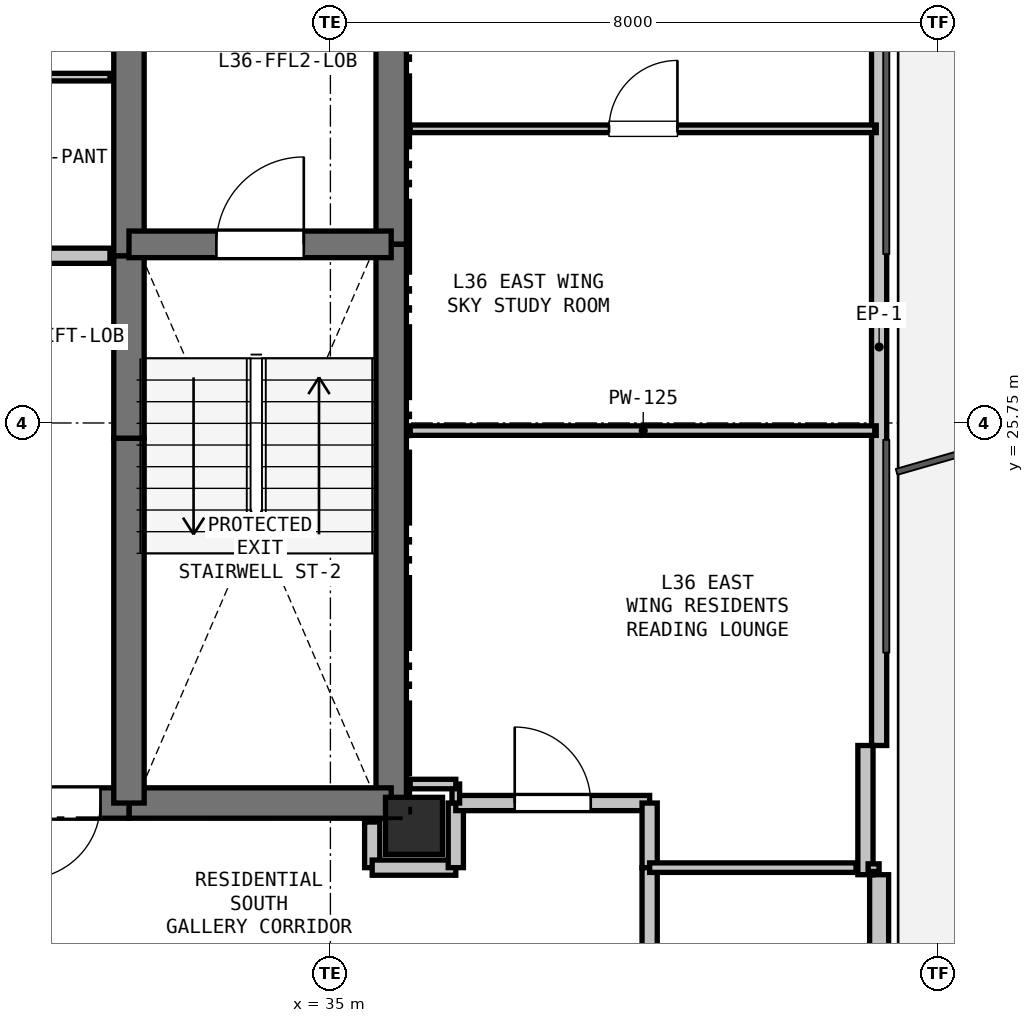
"""IFC4 building model, lengths in metres.
Left out: names, types, materials, properties, quantities, classifications, styles, units other than length and angle.
Written with IfcOpenShell. Run it as: python <this file> out.ifc"""

import sys

from ifc_helpers import new_model, si_unit, direction, frame, frame_2d, origin, origin_2d, place, context, subcontext, project, spatial, rectangle, extrude, element, fill, save


model = new_model("IFC4")
c1 = context("Model", 3, precision=1e-05, world=origin(), true_north=direction((0.0, 1.0)))
c2 = subcontext(c1, "Body", "Model", "MODEL_VIEW")
j1 = project(units=[si_unit("LENGTHUNIT", "METRE"), si_unit("PLANEANGLEUNIT", "RADIAN")], contexts=[c1])
p1 = place(None, origin())
s1 = spatial("IfcSite", under=j1, at=p1, CompositionType="ELEMENT")
p2 = place(p1, origin())
s2 = spatial("IfcBuilding", under=s1, at=p2, CompositionType="ELEMENT")
p3 = place(p2, frame((0.0, 0.0, 131.1)))
s3 = spatial("IfcBuildingStorey", under=s2, at=p3, CompositionType="ELEMENT", Elevation=131.1)
p4 = place(p3, frame((36.1, 20.45, 0.0), z_axis=(0.0, 0.0, 1.0), x_axis=(1.0, 0.0, 0.0)))
e1 = element("IfcColumn", 1, at=p4, inside=s3, PredefinedType="COLUMN", context=c2, shape_type="SweptSolid", body=[
    extrude(rectangle(XDim=0.75, YDim=0.75, at=origin_2d()), origin(), (0.0, 0.0, 1.0), 3.3),
])
p5 = place(p3, frame((42.219, 31.993, 0.0), z_axis=(0.0, 0.0, 1.0), x_axis=(0.0, -1.0, 0.0)))
e2 = element("IfcWall", 2, at=p5, inside=s3, PredefinedType="PARAPET", context=c2, shape_type="SweptSolid", body=[
    extrude(rectangle(XDim=10.486, YDim=0.2, at=frame_2d((5.243, 0.0))), origin(), (0.0, 0.0, 1.0), 0.2),
])
p6 = place(p3, frame((42.219, 19.807, 0.0), z_axis=(0.0, 0.0, 1.0), x_axis=(0.0, -1.0, 0.0)))
e3 = element("IfcWall", 3, at=p6, inside=s3, PredefinedType="SOLIDWALL", context=c2, shape_type="SweptSolid", body=[
    extrude(rectangle(XDim=11.186, YDim=0.25, at=frame_2d((5.593, 0.0))), origin(), (0.0, 0.0, 1.0), 2.68),
])
p7 = place(p6, frame((9.327, 0.0, 0.9)))
e4 = element("IfcOpeningElement", 4, at=p7, cuts=e3, PredefinedType="OPENING", context=c2, shape_type="SweptSolid", body=[
    extrude(rectangle(XDim=1.2, YDim=1.4, at=frame_2d((0.6, 0.7))), frame((0.0, 0.135, 0.0), z_axis=(0.0, -1.0, 0.0), x_axis=(1.0, 0.0, 0.0)), (0.0, 0.0, 1.0), 0.27),
])
p8 = place(p3, frame((42.039, 21.507, 0.0), z_axis=(0.0, 0.0, 1.0), x_axis=(0.0, -1.0, 0.0)))
e5 = element("IfcWall", 5, at=p8, inside=s3, PredefinedType="PARAPET", context=c2, shape_type="SweptSolid", body=[
    extrude(rectangle(XDim=1.7, YDim=0.2, at=frame_2d((0.85, 0.0))), origin(), (0.0, 0.0, 1.0), 2.68),
])
p9 = place(p3, frame((35.8, 32.75, 0.0), z_axis=(0.0, 0.0, 1.0), x_axis=(0.0, -1.0, 0.0)))
e6 = element("IfcWall", 6, at=p9, inside=s3, PredefinedType="SHEAR", context=c2, shape_type="SweptSolid", body=[
    extrude(rectangle(XDim=4.65, YDim=0.4, at=frame_2d((2.325, 0.0))), origin(), (0.0, 0.0, 1.0), 3.06),
])
p10 = place(p3, frame((35.8, 28.1, 0.0), z_axis=(0.0, 0.0, 1.0), x_axis=(0.0, -1.0, 0.0)))
e7 = element("IfcWall", 7, at=p10, inside=s3, PredefinedType="SHEAR", context=c2, shape_type="SweptSolid", body=[
    extrude(rectangle(XDim=7.35, YDim=0.4, at=frame_2d((3.675, 0.0))), origin(), (0.0, 0.0, 1.0), 3.06),
])
p11 = place(p3, frame((35.8, 20.75, 0.0), z_axis=(0.0, 0.0, 1.0), x_axis=(-1.0, 0.0, 0.0)))
e8 = element("IfcWall", 8, at=p11, inside=s3, PredefinedType="SHEAR", context=c2, shape_type="SweptSolid", body=[
    extrude(rectangle(XDim=3.45, YDim=0.4, at=frame_2d((1.725, 0.0))), origin(), (0.0, 0.0, 1.0), 3.06),
])
p12 = place(p3, frame((32.35, 20.75, 0.0), z_axis=(0.0, 0.0, 1.0), x_axis=(-1.0, 0.0, 0.0)))
e9 = element("IfcWall", 9, at=p12, inside=s3, PredefinedType="SHEAR", context=c2, shape_type="SweptSolid", body=[
    extrude(rectangle(XDim=1.75, YDim=0.4, at=frame_2d((0.875, 0.0))), origin(), (0.0, 0.0, 1.0), 3.06),
])
p13 = place(p12, frame((0.375, 0.0, 0.0)))
e10 = element("IfcOpeningElement", 10, at=p13, cuts=e9, PredefinedType="OPENING", context=c2, shape_type="SweptSolid", body=[
    extrude(rectangle(XDim=1.0, YDim=2.15, at=frame_2d((0.5, 1.075))), frame((0.0, 0.21, 0.0), z_axis=(0.0, -1.0, 0.0), x_axis=(1.0, 0.0, 0.0)), (0.0, 0.0, 1.0), 0.42),
])
p14 = place(p3, frame((32.35, 20.75, 0.0), z_axis=(0.0, 0.0, 1.0), x_axis=(0.0, 1.0, 0.0)))
e11 = element("IfcWall", 11, at=p14, inside=s3, PredefinedType="SHEAR", context=c2, shape_type="SweptSolid", body=[
    extrude(rectangle(XDim=4.8, YDim=0.4, at=frame_2d((2.4, 0.0))), origin(), (0.0, 0.0, 1.0), 3.06),
])
p15 = place(p3, frame((32.35, 25.55, 0.0), z_axis=(0.0, 0.0, 1.0), x_axis=(0.0, 1.0, 0.0)))
e12 = element("IfcWall", 12, at=p15, inside=s3, PredefinedType="SHEAR", context=c2, shape_type="SweptSolid", body=[
    extrude(rectangle(XDim=2.4, YDim=0.4, at=frame_2d((1.2, 0.0))), origin(), (0.0, 0.0, 1.0), 3.06),
])
p16 = place(p3, frame((32.35, 27.95, 0.0), z_axis=(0.0, 0.0, 1.0), x_axis=(0.0, 1.0, 0.0)))
e13 = element("IfcWall", 13, at=p16, inside=s3, PredefinedType="SHEAR", context=c2, shape_type="SweptSolid", body=[
    extrude(rectangle(XDim=2.8, YDim=0.4, at=frame_2d((1.4, 0.0))), origin(), (0.0, 0.0, 1.0), 3.06),
])
p17 = place(p3, frame((32.35, 28.1, 0.0), z_axis=(0.0, 0.0, 1.0), x_axis=(1.0, 0.0, 0.0)))
e14 = element("IfcWall", 14, at=p17, inside=s3, PredefinedType="SHEAR", context=c2, shape_type="SweptSolid", body=[
    extrude(rectangle(XDim=3.45, YDim=0.35, at=frame_2d((1.725, 0.0))), origin(), (0.0, 0.0, 1.0), 3.06),
])
p18 = place(p17, frame((1.15, 0.0, 0.0)))
e15 = element("IfcOpeningElement", 15, at=p18, cuts=e14, PredefinedType="OPENING", context=c2, shape_type="SweptSolid", body=[
    extrude(rectangle(XDim=1.15, YDim=2.15, at=frame_2d((0.575, 1.075))), frame((0.0, 0.185, 0.0), z_axis=(0.0, -1.0, 0.0), x_axis=(1.0, 0.0, 0.0)), (0.0, 0.0, 1.0), 0.37),
])
p19 = place(p3, frame((32.1, 30.3, 0.0), z_axis=(0.0, 0.0, 1.0), x_axis=(-1.0, 0.0, 0.0)))
e16 = element("IfcWall", 16, at=p19, inside=s3, PredefinedType="PARTITIONING", context=c2, shape_type="SweptSolid", body=[
    extrude(rectangle(XDim=2.45, YDim=0.1, at=frame_2d((1.225, 0.0))), origin(), (0.0, 0.0, 1.0), 3.06),
])
p20 = place(p3, frame((27.4, 27.95, 0.0), z_axis=(0.0, 0.0, 1.0), x_axis=(1.0, 0.0, 0.0)))
e17 = element("IfcWall", 17, at=p20, inside=s3, PredefinedType="PARTITIONING", context=c2, shape_type="SweptSolid", body=[
    extrude(rectangle(XDim=4.7, YDim=0.2, at=frame_2d((2.35, 0.0))), origin(), (0.0, 0.0, 1.0), 3.06),
])
p21 = place(p20, frame((1.85, 0.0, 0.0)))
e18 = element("IfcOpeningElement", 18, at=p21, cuts=e17, PredefinedType="OPENING", context=c2, shape_type="SweptSolid", body=[
    extrude(rectangle(XDim=1.0, YDim=2.15, at=frame_2d((0.5, 1.075))), frame((0.0, 0.11, 0.0), z_axis=(0.0, -1.0, 0.0), x_axis=(1.0, 0.0, 0.0)), (0.0, 0.0, 1.0), 0.22),
])
p22 = place(p3, frame((35.55, 20.5, 0.0), z_axis=(0.0, 0.0, 1.0), x_axis=(0.0, -1.0, 0.0)))
e19 = element("IfcWall", 19, at=p22, inside=s3, PredefinedType="PARTITIONING", context=c2, shape_type="SweptSolid", body=[
    extrude(rectangle(XDim=0.6, YDim=0.2, at=frame_2d((0.3, 0.0))), origin(), (0.0, 0.0, 1.0), 2.508),
])
p23 = place(p3, frame((35.55, 19.9, 0.0), z_axis=(0.0, 0.0, 1.0), x_axis=(1.0, 0.0, 0.0)))
e20 = element("IfcWall", 20, at=p23, inside=s3, PredefinedType="PARTITIONING", context=c2, shape_type="SweptSolid", body=[
    extrude(rectangle(XDim=1.1, YDim=0.2, at=frame_2d((0.55, 0.0))), origin(), (0.0, 0.0, 1.0), 2.433),
])
p24 = place(p3, frame((36.65, 19.9, 0.0), z_axis=(0.0, 0.0, 1.0), x_axis=(0.0, 1.0, 0.0)))
e21 = element("IfcWall", 21, at=p24, inside=s3, PredefinedType="PARTITIONING", context=c2, shape_type="SweptSolid", body=[
    extrude(rectangle(XDim=0.85, YDim=0.2, at=frame_2d((0.425, 0.0))), origin(), (0.0, 0.0, 1.0), 3.06),
])
p25 = place(p3, frame((36.65, 20.75, 0.0), z_axis=(0.0, 0.0, 1.0), x_axis=(1.0, 0.0, 0.0)))
e22 = element("IfcWall", 22, at=p25, inside=s3, PredefinedType="PARTITIONING", context=c2, shape_type="SweptSolid", body=[
    extrude(rectangle(XDim=2.55, YDim=0.2, at=frame_2d((1.275, 0.0))), origin(), (0.0, 0.0, 1.0), 3.06),
])
p26 = place(p25, frame((0.775, 0.0, 0.0)))
e23 = element("IfcOpeningElement", 23, at=p26, cuts=e22, PredefinedType="OPENING", context=c2, shape_type="SweptSolid", body=[
    extrude(rectangle(XDim=1.0, YDim=2.15, at=frame_2d((0.5, 1.075))), frame((0.0, 0.11, 0.0), z_axis=(0.0, -1.0, 0.0), x_axis=(1.0, 0.0, 0.0)), (0.0, 0.0, 1.0), 0.22),
])
p27 = place(p3, frame((39.2, 20.75, 0.0), z_axis=(0.0, 0.0, 1.0), x_axis=(0.0, -1.0, 0.0)))
e24 = element("IfcWall", 24, at=p27, inside=s3, PredefinedType="PARTITIONING", context=c2, shape_type="SweptSolid", body=[
    extrude(rectangle(XDim=0.85, YDim=0.2, at=frame_2d((0.425, 0.0))), origin(), (0.0, 0.0, 1.0), 3.06),
])
p28 = place(p3, frame((39.2, 19.9, 0.0), z_axis=(0.0, 0.0, 1.0), x_axis=(0.0, -1.0, 0.0)))
e25 = element("IfcWall", 25, at=p28, inside=s3, PredefinedType="PARTITIONING", context=c2, shape_type="SweptSolid", body=[
    extrude(rectangle(XDim=1.75, YDim=0.2, at=frame_2d((0.875, 0.0))), origin(), (0.0, 0.0, 1.0), 3.06),
])
p29 = place(p3, frame((36.05, 29.62, 0.0), z_axis=(0.0, 0.0, 1.0), x_axis=(1.0, 0.0, 0.0)))
e26 = element("IfcWall", 26, at=p29, inside=s3, PredefinedType="PARTITIONING", context=c2, shape_type="SweptSolid", body=[
    extrude(rectangle(XDim=6.131, YDim=0.1, at=frame_2d((3.065, 0.0))), origin(), (0.0, 0.0, 1.0), 2.365),
])
p30 = place(p29, frame((2.615, 0.0, 0.0)))
e27 = element("IfcOpeningElement", 27, at=p30, cuts=e26, PredefinedType="OPENING", context=c2, shape_type="SweptSolid", body=[
    extrude(rectangle(XDim=0.9, YDim=2.1, at=frame_2d((0.45, 1.05))), frame((0.0, 0.06, 0.0), z_axis=(0.0, -1.0, 0.0), x_axis=(1.0, 0.0, 0.0)), (0.0, 0.0, 1.0), 0.12),
])
p31 = place(p3, frame((42.181, 25.65, 0.0), z_axis=(0.0, 0.0, 1.0), x_axis=(-1.0, 0.0, 0.0)))
e28 = element("IfcWall", 28, at=p31, inside=s3, PredefinedType="PARTITIONING", context=c2, shape_type="SweptSolid", body=[
    extrude(rectangle(XDim=6.131, YDim=0.125, at=frame_2d((3.065, 0.0))), origin(), (0.0, 0.0, 1.0), 2.365),
])
p32 = place(p3, frame((36.65, 20.75, 0.0), z_axis=(0.0, 0.0, 1.0), x_axis=(0.0, 1.0, 0.0)))
e29 = element("IfcWall", 29, at=p32, inside=s3, PredefinedType="PARTITIONING", context=c2, shape_type="SweptSolid", body=[
    extrude(rectangle(XDim=0.25, YDim=0.1, at=frame_2d((0.125, 0.0))), origin(), (0.0, 0.0, 1.0), 3.06),
])
p33 = place(p3, frame((36.65, 21.0, 0.0), z_axis=(0.0, 0.0, 1.0), x_axis=(-1.0, 0.0, 0.0)))
e30 = element("IfcWall", 30, at=p33, inside=s3, PredefinedType="PARTITIONING", context=c2, shape_type="SweptSolid", body=[
    extrude(rectangle(XDim=0.6, YDim=0.125, at=frame_2d((0.3, 0.0))), origin(), (0.0, 0.0, 1.0), 2.508),
])
p34 = place(p3, frame((42.219, 19.9, 0.0), z_axis=(0.0, 0.0, 1.0), x_axis=(-1.0, 0.0, 0.0)))
e31 = element("IfcWall", 31, at=p34, inside=s3, PredefinedType="PARTITIONING", context=c2, shape_type="SweptSolid", body=[
    extrude(rectangle(XDim=0.145, YDim=0.1, at=frame_2d((0.072, 0.0))), origin(), (0.0, 0.0, 1.0), 3.06),
])
p35 = place(p3, frame((41.915, 19.9, 0.0), z_axis=(0.0, 0.0, 1.0), x_axis=(-1.0, 0.0, 0.0)))
e32 = element("IfcWall", 32, at=p35, inside=s3, PredefinedType="PARTITIONING", context=c2, shape_type="SweptSolid", body=[
    extrude(rectangle(XDim=2.715, YDim=0.125, at=frame_2d((1.358, 0.0))), origin(), (0.0, 0.0, 1.0), 2.365),
])
p36 = place(p13, origin())
e33 = element("IfcDoor", 33, at=p36, inside=s3, OperationType="SINGLE_SWING_RIGHT", PredefinedType="DOOR", context=c2, shape_type="SweptSolid", body=[
    extrude(rectangle(XDim=1.0, YDim=2.15, at=frame_2d((0.5, 1.075))), frame((0.0, 0.025, 0.0), z_axis=(0.0, -1.0, 0.0), x_axis=(1.0, 0.0, 0.0)), (0.0, 0.0, 1.0), 0.05),
])
fill(e10, e33)
p37 = place(p18, origin())
e34 = element("IfcDoor", 34, at=p37, inside=s3, OperationType="SINGLE_SWING_RIGHT", PredefinedType="DOOR", context=c2, shape_type="SweptSolid", body=[
    extrude(rectangle(XDim=1.15, YDim=2.15, at=frame_2d((0.575, 1.075))), frame((0.0, 0.025, 0.0), z_axis=(0.0, -1.0, 0.0), x_axis=(1.0, 0.0, 0.0)), (0.0, 0.0, 1.0), 0.05),
])
fill(e15, e34)
p38 = place(p26, origin())
e35 = element("IfcDoor", 35, at=p38, inside=s3, OperationType="SINGLE_SWING_LEFT", PredefinedType="DOOR", context=c2, shape_type="SweptSolid", body=[
    extrude(rectangle(XDim=1.0, YDim=2.15, at=frame_2d((0.5, 1.075))), frame((0.0, 0.025, 0.0), z_axis=(0.0, -1.0, 0.0), x_axis=(1.0, 0.0, 0.0)), (0.0, 0.0, 1.0), 0.05),
])
fill(e23, e35)
p39 = place(p30, origin())
e36 = element("IfcDoor", 36, at=p39, inside=s3, OperationType="SINGLE_SWING_RIGHT", PredefinedType="DOOR", context=c2, shape_type="SweptSolid", body=[
    extrude(rectangle(XDim=0.9, YDim=2.1, at=frame_2d((0.45, 1.05))), frame((0.0, 0.025, 0.0), z_axis=(0.0, -1.0, 0.0), x_axis=(1.0, 0.0, 0.0)), (0.0, 0.0, 1.0), 0.05),
])
fill(e27, e36)
save(model, sys.argv[1])
